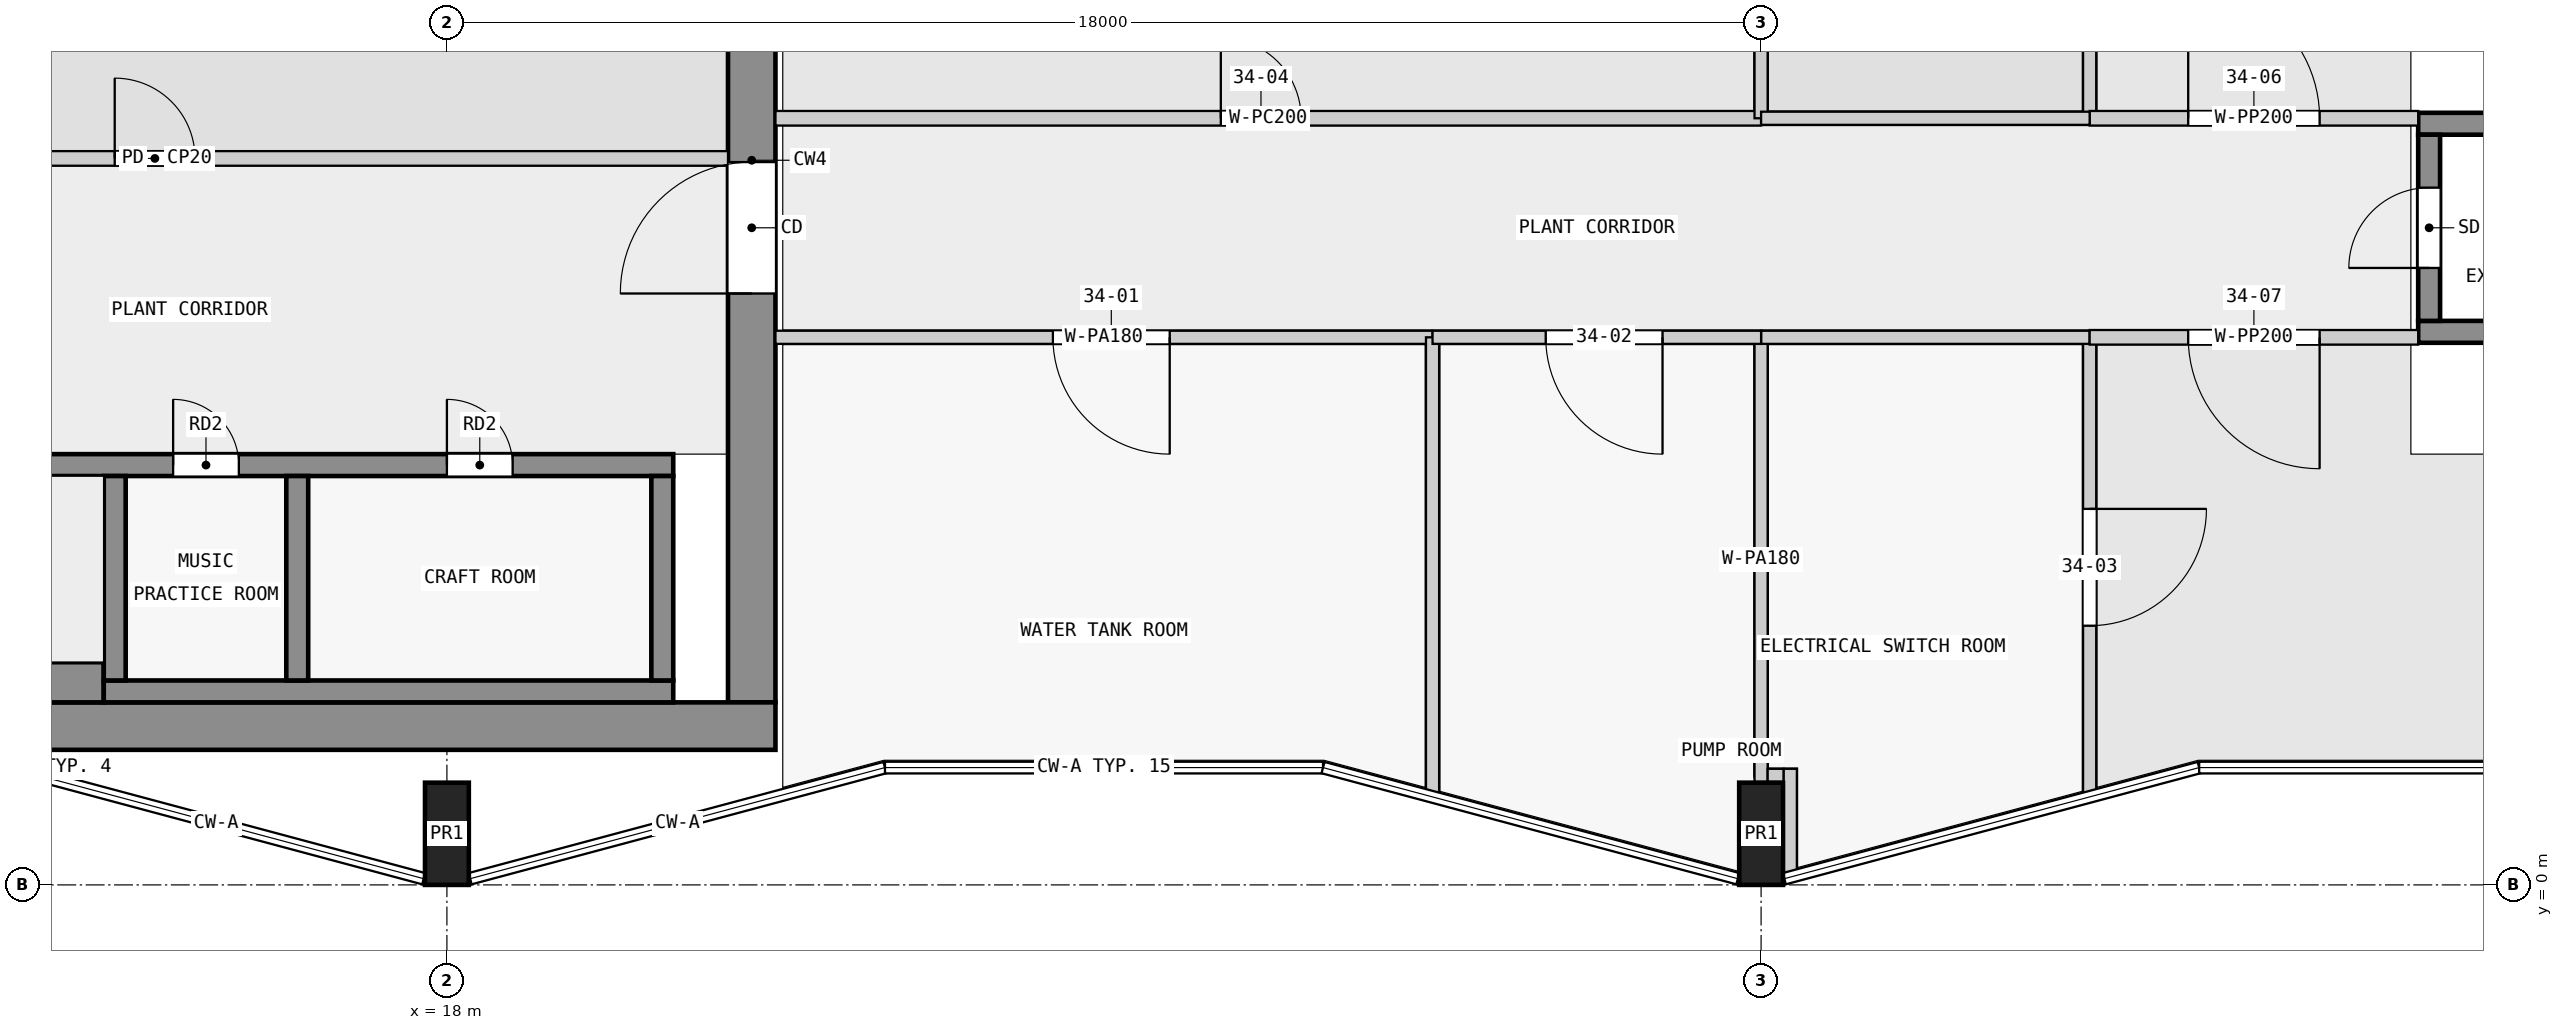
"""IFC4 building model, lengths in metres.
Left out: names, types, materials, properties, quantities, classifications, styles, units other than length and angle.
Written with IfcOpenShell. Run it as: python <this file> out.ifc"""

import sys

from ifc_helpers import new_model, si_unit, direction, frame, frame_2d, origin, origin_2d, place, context, subcontext, project, spatial, rectangle, extrude, element, fill, save


model = new_model("IFC4")
c1 = context("Model", 3, precision=1e-05, world=origin(), true_north=direction((0.0, 1.0)))
c2 = subcontext(c1, "Body", "Model", "MODEL_VIEW")
j1 = project(units=[si_unit("LENGTHUNIT", "METRE"), si_unit("PLANEANGLEUNIT", "RADIAN")], contexts=[c1])
p1 = place(None, origin())
s1 = spatial("IfcSite", under=j1, at=p1, CompositionType="ELEMENT")
p2 = place(p1, origin())
s2 = spatial("IfcBuilding", under=s1, at=p2, CompositionType="ELEMENT")
p3 = place(p2, frame((0.0, 0.0, 134.6)))
s3 = spatial("IfcBuildingStorey", under=s2, at=p3, CompositionType="ELEMENT", Elevation=134.6)
for number, where, z_axis, x_axis in (
    (1, (18.0, 0.7, 0.0), (0.0, 0.0, 1.0), (1.0, 0.0, 0.0)),
    (2, (36.0, 0.7, 0.0), (0.0, 0.0, 1.0), (1.0, 0.0, 0.0)),
):
    element("IfcColumn", number, at=place(p3, frame(where, z_axis=z_axis, x_axis=x_axis)), inside=s3, PredefinedType="COLUMN", context=c2, shape_type="SweptSolid", body=[
        extrude(rectangle(XDim=0.6, YDim=1.4, at=origin_2d()), origin(), (0.0, 0.0, 1.0), 4.8),
    ])
p4 = place(p3, frame((1.65, 2.175, 0.0), z_axis=(0.0, 0.0, 1.0), x_axis=(1.0, 0.0, 0.0)))
e3 = element("IfcWall", 3, at=p4, inside=s3, PredefinedType="SHEAR", context=c2, shape_type="SweptSolid", body=[
    extrude(rectangle(XDim=20.85, YDim=0.65, at=frame_2d((10.425, 0.0))), origin(), (0.0, 0.0, 1.0), 4.3),
])
p5 = place(p3, frame((22.175, 2.5, 0.0), z_axis=(0.0, 0.0, 1.0), x_axis=(0.0, 1.0, 0.0)))
e4 = element("IfcWall", 4, at=p5, inside=s3, PredefinedType="SHEAR", context=c2, shape_type="SweptSolid", body=[
    extrude(rectangle(XDim=14.85, YDim=0.65, at=frame_2d((7.425, 0.0))), origin(), (0.0, 0.0, 1.0), 4.3),
])
p6 = place(p5, frame((5.6, 0.0, 0.0)))
e5 = element("IfcOpeningElement", 5, at=p6, cuts=e4, PredefinedType="OPENING", context=c2, shape_type="SweptSolid", body=[
    extrude(rectangle(XDim=1.8, YDim=2.1, at=frame_2d((0.9, 1.05))), frame((0.0, 0.335, 0.0), z_axis=(0.0, -1.0, 0.0), x_axis=(1.0, 0.0, 0.0)), (0.0, 0.0, 1.0), 0.67),
])
p7 = place(p3, frame((6.9, 2.775, 0.0), z_axis=(0.0, 0.0, 1.0), x_axis=(1.0, 0.0, 0.0)))
e6 = element("IfcWall", 6, at=p7, inside=s3, PredefinedType="SHEAR", context=c2, shape_type="SweptSolid", body=[
    extrude(rectangle(XDim=6.4, YDim=0.55, at=frame_2d((3.2, 0.0))), origin(), (0.0, 0.0, 1.0), 4.3),
])
p8 = place(p3, frame((13.3, 2.65, 0.0), z_axis=(0.0, 0.0, 1.0), x_axis=(1.0, 0.0, 0.0)))
e7 = element("IfcWall", 7, at=p8, inside=s3, PredefinedType="SHEAR", context=c2, shape_type="SweptSolid", body=[
    extrude(rectangle(XDim=7.8, YDim=0.3, at=frame_2d((3.9, 0.0))), origin(), (0.0, 0.0, 1.0), 4.3),
])
for number, where, z_axis, x_axis in (
    (8, (13.45, 2.8, 0.0), (0.0, 0.0, 1.0), (0.0, 1.0, 0.0)),
    (9, (15.95, 2.8, 0.0), (0.0, 0.0, 1.0), (0.0, 1.0, 0.0)),
    (10, (20.95, 2.8, 0.0), (0.0, 0.0, 1.0), (0.0, 1.0, 0.0)),
):
    element("IfcWall", number, at=place(p3, frame(where, z_axis=z_axis, x_axis=x_axis)), inside=s3, PredefinedType="SHEAR", context=c2, shape_type="SweptSolid", body=[
        extrude(rectangle(XDim=2.8, YDim=0.3, at=frame_2d((1.4, 0.0))), origin(), (0.0, 0.0, 1.0), 4.3),
    ])
p9 = place(p3, frame((2.3, 5.75, 0.0), z_axis=(0.0, 0.0, 1.0), x_axis=(1.0, 0.0, 0.0)))
e11 = element("IfcWall", 11, at=p9, inside=s3, PredefinedType="SHEAR", context=c2, shape_type="SweptSolid", body=[
    extrude(rectangle(XDim=18.8, YDim=0.3, at=frame_2d((9.4, 0.0))), origin(), (0.0, 0.0, 1.0), 4.3),
])
p10 = place(p9, frame((4.65, 0.0, 0.0)))
e12 = element("IfcOpeningElement", 12, at=p10, cuts=e11, PredefinedType="OPENING", context=c2, shape_type="SweptSolid", body=[
    extrude(rectangle(XDim=1.1, YDim=2.1, at=frame_2d((0.55, 1.05))), frame((0.0, 0.16, 0.0), z_axis=(0.0, -1.0, 0.0), x_axis=(1.0, 0.0, 0.0)), (0.0, 0.0, 1.0), 0.32),
])
p11 = place(p9, frame((0.45, 0.0, 0.0)))
e13 = element("IfcOpeningElement", 13, at=p11, cuts=e11, PredefinedType="OPENING", context=c2, shape_type="SweptSolid", body=[
    extrude(rectangle(XDim=1.1, YDim=2.1, at=frame_2d((0.55, 1.05))), frame((0.0, 0.16, 0.0), z_axis=(0.0, -1.0, 0.0), x_axis=(1.0, 0.0, 0.0)), (0.0, 0.0, 1.0), 0.32),
])
p12 = place(p9, frame((2.75, 0.0, 0.0)))
e14 = element("IfcOpeningElement", 14, at=p12, cuts=e11, PredefinedType="OPENING", context=c2, shape_type="SweptSolid", body=[
    extrude(rectangle(XDim=1.1, YDim=2.1, at=frame_2d((0.55, 1.05))), frame((0.0, 0.16, 0.0), z_axis=(0.0, -1.0, 0.0), x_axis=(1.0, 0.0, 0.0)), (0.0, 0.0, 1.0), 0.32),
])
p13 = place(p9, frame((11.95, 0.0, 0.0)))
e15 = element("IfcOpeningElement", 15, at=p13, cuts=e11, PredefinedType="OPENING", context=c2, shape_type="SweptSolid", body=[
    extrude(rectangle(XDim=0.9, YDim=2.1, at=frame_2d((0.45, 1.05))), frame((0.0, 0.16, 0.0), z_axis=(0.0, -1.0, 0.0), x_axis=(1.0, 0.0, 0.0)), (0.0, 0.0, 1.0), 0.32),
])
p14 = place(p9, frame((15.7, 0.0, 0.0)))
e16 = element("IfcOpeningElement", 16, at=p14, cuts=e11, PredefinedType="OPENING", context=c2, shape_type="SweptSolid", body=[
    extrude(rectangle(XDim=0.9, YDim=2.1, at=frame_2d((0.45, 1.05))), frame((0.0, 0.16, 0.0), z_axis=(0.0, -1.0, 0.0), x_axis=(1.0, 0.0, 0.0)), (0.0, 0.0, 1.0), 0.32),
])
p15 = place(p3, frame((45.15, 7.725, 0.0), z_axis=(0.0, 0.0, 1.0), x_axis=(0.0, 1.0, 0.0)))
e17 = element("IfcWall", 17, at=p15, inside=s3, PredefinedType="SHEAR", context=c2, shape_type="SweptSolid", body=[
    extrude(rectangle(XDim=2.55, YDim=0.3, at=frame_2d((1.275, 0.0))), origin(), (0.0, 0.0, 1.0), 4.8),
])
p16 = place(p15, frame((0.725, 0.0, 0.0)))
e18 = element("IfcOpeningElement", 18, at=p16, cuts=e17, PredefinedType="OPENING", context=c2, shape_type="SweptSolid", body=[
    extrude(rectangle(XDim=1.1, YDim=2.1, at=frame_2d((0.55, 1.05))), frame((0.0, 0.16, 0.0), z_axis=(0.0, -1.0, 0.0), x_axis=(1.0, 0.0, 0.0)), (0.0, 0.0, 1.0), 0.32),
])
for number, where, z_axis, x_axis in (
    (19, (45.0, 7.575, 0.0), (0.0, 0.0, 1.0), (1.0, 0.0, 0.0)),
    (20, (45.0, 10.425, 0.0), (0.0, 0.0, 1.0), (1.0, 0.0, 0.0)),
):
    element("IfcWall", number, at=place(p3, frame(where, z_axis=z_axis, x_axis=x_axis)), inside=s3, PredefinedType="SHEAR", context=c2, shape_type="SweptSolid", body=[
        extrude(rectangle(XDim=7.2, YDim=0.3, at=frame_2d((3.6, 0.0))), origin(), (0.0, 0.0, 1.0), 4.8),
    ])
p17 = place(p3, frame((7.1, 9.95, 0.0), z_axis=(0.0, 0.0, 1.0), x_axis=(1.0, 0.0, 0.0)))
e21 = element("IfcWall", 21, at=p17, inside=s3, PredefinedType="PARTITIONING", context=c2, shape_type="SweptSolid", body=[
    extrude(rectangle(XDim=14.75, YDim=0.2, at=frame_2d((7.375, 0.0))), origin(), (0.0, 0.0, 1.0), 4.3),
])
p18 = place(p17, frame((6.35, 0.0, 0.0)))
e22 = element("IfcOpeningElement", 22, at=p18, cuts=e21, PredefinedType="OPENING", context=c2, shape_type="SweptSolid", body=[
    extrude(rectangle(XDim=1.1, YDim=2.1, at=frame_2d((0.55, 1.05))), frame((0.0, 0.11, 0.0), z_axis=(0.0, -1.0, 0.0), x_axis=(1.0, 0.0, 0.0)), (0.0, 0.0, 1.0), 0.22),
])
p19 = place(p3, frame((22.5, 10.5, 0.0), z_axis=(0.0, 0.0, 1.0), x_axis=(1.0, 0.0, 0.0)))
e23 = element("IfcWall", 23, at=p19, inside=s3, PredefinedType="PARTITIONING", context=c2, shape_type="SweptSolid", body=[
    extrude(rectangle(XDim=13.5, YDim=0.2, at=frame_2d((6.75, 0.0))), origin(), (0.0, 0.0, 1.0), 4.3),
])
p20 = place(p19, frame((6.1, 0.0, 0.0)))
e24 = element("IfcOpeningElement", 24, at=p20, cuts=e23, PredefinedType="OPENING", context=c2, shape_type="SweptSolid", body=[
    extrude(rectangle(XDim=1.1, YDim=2.1, at=frame_2d((0.55, 1.05))), frame((0.0, 0.11, 0.0), z_axis=(0.0, -1.0, 0.0), x_axis=(1.0, 0.0, 0.0)), (0.0, 0.0, 1.0), 0.22),
])
p21 = place(p3, frame((31.5, 7.5, 0.0), z_axis=(0.0, 0.0, 1.0), x_axis=(-1.0, 0.0, 0.0)))
e25 = element("IfcWall", 25, at=p21, inside=s3, PredefinedType="PARTITIONING", context=c2, shape_type="SweptSolid", body=[
    extrude(rectangle(XDim=9.0, YDim=0.18, at=frame_2d((4.5, 0.0))), origin(), (0.0, 0.0, 1.0), 4.3),
])
p22 = place(p21, frame((3.6, 0.0, 0.0)))
e26 = element("IfcOpeningElement", 26, at=p22, cuts=e25, PredefinedType="OPENING", context=c2, shape_type="SweptSolid", body=[
    extrude(rectangle(XDim=1.6, YDim=2.4, at=frame_2d((0.8, 1.2))), frame((0.0, 0.1, 0.0), z_axis=(0.0, -1.0, 0.0), x_axis=(1.0, 0.0, 0.0)), (0.0, 0.0, 1.0), 0.2),
])
p23 = place(p3, frame((36.0, 7.5, 0.0), z_axis=(0.0, 0.0, 1.0), x_axis=(0.0, -1.0, 0.0)))
e27 = element("IfcWall", 27, at=p23, inside=s3, PredefinedType="PARTITIONING", context=c2, shape_type="SweptSolid", body=[
    extrude(rectangle(XDim=6.09, YDim=0.18, at=frame_2d((3.045, 0.0))), origin(), (0.0, 0.0, 1.0), 4.3),
])
p24 = place(p3, frame((36.09, 1.5, 0.0), z_axis=(0.0, 0.0, 1.0), x_axis=(1.0, 0.0, 0.0)))
e28 = element("IfcWall", 28, at=p24, inside=s3, PredefinedType="PARTITIONING", context=c2, shape_type="SweptSolid", body=[
    extrude(rectangle(XDim=0.22, YDim=0.18, at=frame_2d((0.11, 0.0))), origin(), (0.0, 0.0, 1.0), 4.3),
])
p25 = place(p3, frame((36.4, 1.59, 0.0), z_axis=(0.0, 0.0, 1.0), x_axis=(0.0, -1.0, 0.0)))
e29 = element("IfcWall", 29, at=p25, inside=s3, PredefinedType="PARTITIONING", context=c2, shape_type="SweptSolid", body=[
    extrude(rectangle(XDim=1.483, YDim=0.18, at=frame_2d((0.742, 0.0))), origin(), (0.0, 0.0, 1.0), 4.3),
])
p26 = place(p3, frame((36.0, 16.59, 0.0), z_axis=(0.0, 0.0, 1.0), x_axis=(0.0, -1.0, 0.0)))
e30 = element("IfcWall", 30, at=p26, inside=s3, PredefinedType="PARTITIONING", context=c2, shape_type="SweptSolid", body=[
    extrude(rectangle(XDim=6.09, YDim=0.18, at=frame_2d((3.045, 0.0))), origin(), (0.0, 0.0, 1.0), 4.3),
])
p27 = place(p3, frame((40.5, 7.5, 0.0), z_axis=(0.0, 0.0, 1.0), x_axis=(0.0, -1.0, 0.0)))
e31 = element("IfcWall", 31, at=p27, inside=s3, PredefinedType="PARTITIONING", context=c2, shape_type="SweptSolid", body=[
    extrude(rectangle(XDim=6.295, YDim=0.18, at=frame_2d((3.147, 0.0))), origin(), (0.0, 0.0, 1.0), 4.3),
])
p28 = place(p27, frame((2.35, 0.0, 0.0)))
e32 = element("IfcOpeningElement", 32, at=p28, cuts=e31, PredefinedType="OPENING", context=c2, shape_type="SweptSolid", body=[
    extrude(rectangle(XDim=1.6, YDim=2.4, at=frame_2d((0.8, 1.2))), frame((0.0, 0.1, 0.0), z_axis=(0.0, -1.0, 0.0), x_axis=(1.0, 0.0, 0.0)), (0.0, 0.0, 1.0), 0.2),
])
p29 = place(p3, frame((40.5, 16.795, 0.0), z_axis=(0.0, 0.0, 1.0), x_axis=(0.0, -1.0, 0.0)))
e33 = element("IfcWall", 33, at=p29, inside=s3, PredefinedType="PARTITIONING", context=c2, shape_type="SweptSolid", body=[
    extrude(rectangle(XDim=6.295, YDim=0.18, at=frame_2d((3.147, 0.0))), origin(), (0.0, 0.0, 1.0), 4.3),
])
p30 = place(p29, frame((2.35, 0.0, 0.0)))
e34 = element("IfcOpeningElement", 34, at=p30, cuts=e33, PredefinedType="OPENING", context=c2, shape_type="SweptSolid", body=[
    extrude(rectangle(XDim=1.6, YDim=2.4, at=frame_2d((0.8, 1.2))), frame((0.0, 0.1, 0.0), z_axis=(0.0, -1.0, 0.0), x_axis=(1.0, 0.0, 0.0)), (0.0, 0.0, 1.0), 0.2),
])
p31 = place(p3, frame((31.5, 7.5, 0.0), z_axis=(0.0, 0.0, 1.0), x_axis=(0.0, -1.0, 0.0)))
e35 = element("IfcWall", 35, at=p31, inside=s3, PredefinedType="PARTITIONING", context=c2, shape_type="SweptSolid", body=[
    extrude(rectangle(XDim=6.295, YDim=0.18, at=frame_2d((3.147, 0.0))), origin(), (0.0, 0.0, 1.0), 4.3),
])
p32 = place(p3, frame((40.5, 7.5, 0.0), z_axis=(0.0, 0.0, 1.0), x_axis=(-1.0, 0.0, 0.0)))
e36 = element("IfcWall", 36, at=p32, inside=s3, PredefinedType="PARTITIONING", context=c2, shape_type="SweptSolid", body=[
    extrude(rectangle(XDim=4.5, YDim=0.18, at=frame_2d((2.25, 0.0))), origin(), (0.0, 0.0, 1.0), 4.3),
])
p33 = place(p3, frame((40.5, 10.5, 0.0), z_axis=(0.0, 0.0, 1.0), x_axis=(1.0, 0.0, 0.0)))
e37 = element("IfcWall", 37, at=p33, inside=s3, PredefinedType="PARTITIONING", context=c2, shape_type="SweptSolid", body=[
    extrude(rectangle(XDim=4.5, YDim=0.2, at=frame_2d((2.25, 0.0))), origin(), (0.0, 0.0, 1.0), 4.3),
])
p34 = place(p33, frame((1.35, 0.0, 0.0)))
e38 = element("IfcOpeningElement", 38, at=p34, cuts=e37, PredefinedType="OPENING", context=c2, shape_type="SweptSolid", body=[
    extrude(rectangle(XDim=1.8, YDim=2.1, at=frame_2d((0.9, 1.05))), frame((0.0, 0.11, 0.0), z_axis=(0.0, -1.0, 0.0), x_axis=(1.0, 0.0, 0.0)), (0.0, 0.0, 1.0), 0.22),
])
p35 = place(p3, frame((36.0, 10.5, 0.0), z_axis=(0.0, 0.0, 1.0), x_axis=(1.0, 0.0, 0.0)))
e39 = element("IfcWall", 39, at=p35, inside=s3, PredefinedType="PARTITIONING", context=c2, shape_type="SweptSolid", body=[
    extrude(rectangle(XDim=4.5, YDim=0.18, at=frame_2d((2.25, 0.0))), origin(), (0.0, 0.0, 1.0), 4.3),
])
p36 = place(p3, frame((36.0, 7.5, 0.0), z_axis=(0.0, 0.0, 1.0), x_axis=(-1.0, 0.0, 0.0)))
e40 = element("IfcWall", 40, at=p36, inside=s3, PredefinedType="PARTITIONING", context=c2, shape_type="SweptSolid", body=[
    extrude(rectangle(XDim=4.5, YDim=0.18, at=frame_2d((2.25, 0.0))), origin(), (0.0, 0.0, 1.0), 4.3),
])
p37 = place(p36, frame((1.35, 0.0, 0.0)))
e41 = element("IfcOpeningElement", 41, at=p37, cuts=e40, PredefinedType="OPENING", context=c2, shape_type="SweptSolid", body=[
    extrude(rectangle(XDim=1.6, YDim=2.4, at=frame_2d((0.8, 1.2))), frame((0.0, 0.1, 0.0), z_axis=(0.0, -1.0, 0.0), x_axis=(1.0, 0.0, 0.0)), (0.0, 0.0, 1.0), 0.2),
])
p38 = place(p3, frame((45.0, 7.5, 0.0), z_axis=(0.0, 0.0, 1.0), x_axis=(-1.0, 0.0, 0.0)))
e42 = element("IfcWall", 42, at=p38, inside=s3, PredefinedType="PARTITIONING", context=c2, shape_type="SweptSolid", body=[
    extrude(rectangle(XDim=4.5, YDim=0.2, at=frame_2d((2.25, 0.0))), origin(), (0.0, 0.0, 1.0), 4.3),
])
p39 = place(p38, frame((1.35, 0.0, 0.0)))
e43 = element("IfcOpeningElement", 43, at=p39, cuts=e42, PredefinedType="OPENING", context=c2, shape_type="SweptSolid", body=[
    extrude(rectangle(XDim=1.8, YDim=2.1, at=frame_2d((0.9, 1.05))), frame((0.0, 0.11, 0.0), z_axis=(0.0, -1.0, 0.0), x_axis=(1.0, 0.0, 0.0)), (0.0, 0.0, 1.0), 0.22),
])
p40 = place(p18, origin())
e44 = element("IfcDoor", 44, at=p40, inside=s3, OperationType="SINGLE_SWING_LEFT", PredefinedType="DOOR", context=c2, shape_type="SweptSolid", body=[
    extrude(rectangle(XDim=1.1, YDim=2.1, at=frame_2d((0.55, 1.05))), frame((0.0, 0.025, 0.0), z_axis=(0.0, -1.0, 0.0), x_axis=(1.0, 0.0, 0.0)), (0.0, 0.0, 1.0), 0.05),
])
fill(e22, e44)
p41 = place(p6, origin())
e45 = element("IfcDoor", 45, at=p41, inside=s3, OperationType="DOUBLE_DOOR_SINGLE_SWING", PredefinedType="DOOR", context=c2, shape_type="SweptSolid", body=[
    extrude(rectangle(XDim=1.8, YDim=2.1, at=frame_2d((0.9, 1.05))), frame((0.0, 0.025, 0.0), z_axis=(0.0, -1.0, 0.0), x_axis=(1.0, 0.0, 0.0)), (0.0, 0.0, 1.0), 0.05),
])
fill(e5, e45)
p42 = place(p13, origin())
e46 = element("IfcDoor", 46, at=p42, inside=s3, OperationType="SINGLE_SWING_LEFT", PredefinedType="DOOR", context=c2, shape_type="SweptSolid", body=[
    extrude(rectangle(XDim=0.9, YDim=2.1, at=frame_2d((0.45, 1.05))), frame((0.0, 0.025, 0.0), z_axis=(0.0, -1.0, 0.0), x_axis=(1.0, 0.0, 0.0)), (0.0, 0.0, 1.0), 0.05),
])
fill(e15, e46)
p43 = place(p14, origin())
e47 = element("IfcDoor", 47, at=p43, inside=s3, OperationType="SINGLE_SWING_LEFT", PredefinedType="DOOR", context=c2, shape_type="SweptSolid", body=[
    extrude(rectangle(XDim=0.9, YDim=2.1, at=frame_2d((0.45, 1.05))), frame((0.0, 0.025, 0.0), z_axis=(0.0, -1.0, 0.0), x_axis=(1.0, 0.0, 0.0)), (0.0, 0.0, 1.0), 0.05),
])
fill(e16, e47)
p44 = place(p16, origin())
e48 = element("IfcDoor", 48, at=p44, inside=s3, OperationType="SINGLE_SWING_LEFT", PredefinedType="DOOR", context=c2, shape_type="SweptSolid", body=[
    extrude(rectangle(XDim=1.1, YDim=2.1, at=frame_2d((0.55, 1.05))), frame((0.0, 0.025, 0.0), z_axis=(0.0, -1.0, 0.0), x_axis=(1.0, 0.0, 0.0)), (0.0, 0.0, 1.0), 0.05),
])
fill(e18, e48)
p45 = place(p22, origin())
e49 = element("IfcDoor", 49, at=p45, inside=s3, OperationType="SINGLE_SWING_LEFT", PredefinedType="DOOR", context=c2, shape_type="SweptSolid", body=[
    extrude(rectangle(XDim=1.6, YDim=2.4, at=frame_2d((0.8, 1.2))), frame((0.0, 0.025, 0.0), z_axis=(0.0, -1.0, 0.0), x_axis=(1.0, 0.0, 0.0)), (0.0, 0.0, 1.0), 0.05),
])
fill(e26, e49)
p46 = place(p37, origin())
e50 = element("IfcDoor", 50, at=p46, inside=s3, OperationType="SINGLE_SWING_LEFT", PredefinedType="DOOR", context=c2, shape_type="SweptSolid", body=[
    extrude(rectangle(XDim=1.6, YDim=2.4, at=frame_2d((0.8, 1.2))), frame((0.0, 0.025, 0.0), z_axis=(0.0, -1.0, 0.0), x_axis=(1.0, 0.0, 0.0)), (0.0, 0.0, 1.0), 0.05),
])
fill(e41, e50)
p47 = place(p28, origin())
e51 = element("IfcDoor", 51, at=p47, inside=s3, OperationType="SINGLE_SWING_LEFT", PredefinedType="DOOR", context=c2, shape_type="SweptSolid", body=[
    extrude(rectangle(XDim=1.6, YDim=2.4, at=frame_2d((0.8, 1.2))), frame((0.0, 0.025, 0.0), z_axis=(0.0, -1.0, 0.0), x_axis=(1.0, 0.0, 0.0)), (0.0, 0.0, 1.0), 0.05),
])
fill(e32, e51)
p48 = place(p20, origin())
e52 = element("IfcDoor", 52, at=p48, inside=s3, OperationType="SINGLE_SWING_LEFT", PredefinedType="DOOR", context=c2, shape_type="SweptSolid", body=[
    extrude(rectangle(XDim=1.1, YDim=2.1, at=frame_2d((0.55, 1.05))), frame((0.0, 0.025, 0.0), z_axis=(0.0, -1.0, 0.0), x_axis=(1.0, 0.0, 0.0)), (0.0, 0.0, 1.0), 0.05),
])
fill(e24, e52)
p49 = place(p34, origin())
e53 = element("IfcDoor", 53, at=p49, inside=s3, OperationType="DOUBLE_DOOR_SINGLE_SWING", PredefinedType="DOOR", context=c2, shape_type="SweptSolid", body=[
    extrude(rectangle(XDim=1.8, YDim=2.1, at=frame_2d((0.9, 1.05))), frame((0.0, 0.025, 0.0), z_axis=(0.0, -1.0, 0.0), x_axis=(1.0, 0.0, 0.0)), (0.0, 0.0, 1.0), 0.05),
])
fill(e38, e53)
p50 = place(p39, origin())
e54 = element("IfcDoor", 54, at=p50, inside=s3, OperationType="DOUBLE_DOOR_SINGLE_SWING", PredefinedType="DOOR", context=c2, shape_type="SweptSolid", body=[
    extrude(rectangle(XDim=1.8, YDim=2.1, at=frame_2d((0.9, 1.05))), frame((0.0, 0.025, 0.0), z_axis=(0.0, -1.0, 0.0), x_axis=(1.0, 0.0, 0.0)), (0.0, 0.0, 1.0), 0.05),
])
fill(e43, e54)
save(model, sys.argv[1])
